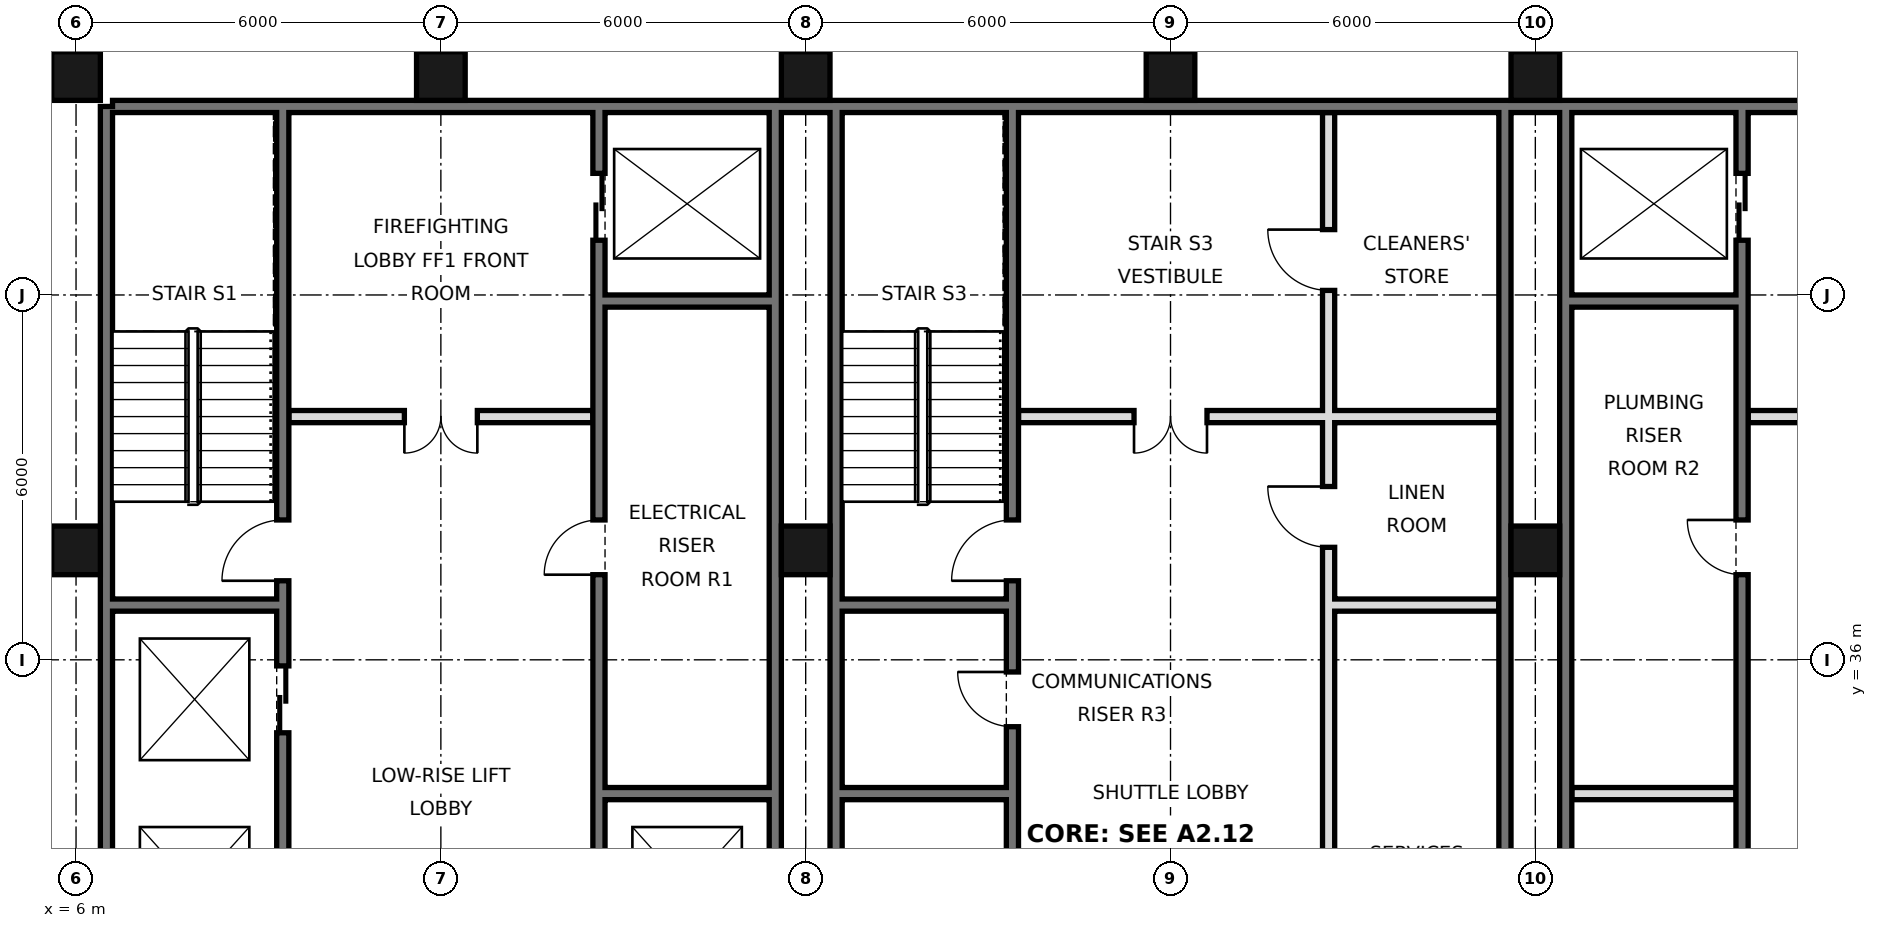
"""IFC4 building model, lengths in metres.
Left out: names, types, materials, properties, quantities, classifications, styles, units other than length and angle.
Written with IfcOpenShell. Run it as: python <this file> out.ifc"""

import sys

from ifc_helpers import new_model, si_unit, direction, frame, frame_2d, origin, origin_2d, place, context, subcontext, project, spatial, rectangle, hollow_rectangle, extrude, element, fill, save


model = new_model("IFC4")
c1 = context("Model", 3, precision=1e-05, world=origin(), true_north=direction((0.0, 1.0)))
c2 = subcontext(c1, "Body", "Model", "MODEL_VIEW")
j1 = project(units=[si_unit("LENGTHUNIT", "METRE"), si_unit("PLANEANGLEUNIT", "RADIAN")], contexts=[c1])
p1 = place(None, origin())
s1 = spatial("IfcSite", under=j1, at=p1, CompositionType="ELEMENT")
p2 = place(p1, origin())
s2 = spatial("IfcBuilding", under=s1, at=p2, CompositionType="ELEMENT")
p3 = place(p2, frame((0.0, 0.0, 49.8)))
s3 = spatial("IfcBuildingStorey", under=s2, at=p3, CompositionType="ELEMENT", Elevation=49.8)
for number, where, z_axis, x_axis in (
    (1, (6.0, 37.8, 0.0), (0.0, 0.0, 1.0), (1.0, 0.0, 0.0)),
    (2, (6.0, 45.6, 0.0), (0.0, 0.0, 1.0), (1.0, 0.0, 0.0)),
    (3, (12.0, 45.6, 0.0), (0.0, 0.0, 1.0), (1.0, 0.0, 0.0)),
    (4, (18.0, 37.8, 0.0), (0.0, 0.0, 1.0), (1.0, 0.0, 0.0)),
    (5, (18.0, 45.6, 0.0), (0.0, 0.0, 1.0), (1.0, 0.0, 0.0)),
    (6, (24.0, 45.6, 0.0), (0.0, 0.0, 1.0), (1.0, 0.0, 0.0)),
    (7, (30.0, 37.8, 0.0), (0.0, 0.0, 1.0), (1.0, 0.0, 0.0)),
    (8, (30.0, 45.6, 0.0), (0.0, 0.0, 1.0), (1.0, 0.0, 0.0)),
):
    element("IfcColumn", number, at=place(p3, frame(where, z_axis=z_axis, x_axis=x_axis)), inside=s3, PredefinedType="COLUMN", context=c2, shape_type="SweptSolid", body=[
        extrude(hollow_rectangle(XDim=0.8, YDim=0.8, WallThickness=0.06, at=origin_2d()), origin(), (0.0, 0.0, 1.0), 3.6),
    ])
p4 = place(p3, frame((6.5, 21.6, 0.0), z_axis=(0.0, 0.0, 1.0), x_axis=(0.0, 1.0, 0.0)))
e9 = element("IfcWall", 9, at=p4, inside=s3, PredefinedType="SOLIDWALL", context=c2, shape_type="SweptSolid", body=[
    extrude(rectangle(XDim=23.5, YDim=0.2, at=frame_2d((11.75, 0.0))), origin(), (0.0, 0.0, 1.0), 3.42),
])
p5 = place(p3, frame((6.6, 45.1, 0.0), z_axis=(0.0, 0.0, 1.0), x_axis=(1.0, 0.0, 0.0)))
e10 = element("IfcWall", 10, at=p5, inside=s3, PredefinedType="SOLIDWALL", context=c2, shape_type="SweptSolid", body=[
    extrude(rectangle(XDim=34.8, YDim=0.2, at=frame_2d((17.4, 0.0))), origin(), (0.0, 0.0, 1.0), 3.42),
])
for number, where, z_axis, x_axis in (
    (11, (17.5, 27.6, 0.0), (0.0, 0.0, 1.0), (0.0, 1.0, 0.0)),
    (12, (18.5, 27.6, 0.0), (0.0, 0.0, 1.0), (0.0, 1.0, 0.0)),
    (13, (29.5, 27.6, 0.0), (0.0, 0.0, 1.0), (0.0, 1.0, 0.0)),
    (14, (30.5, 27.6, 0.0), (0.0, 0.0, 1.0), (0.0, 1.0, 0.0)),
):
    element("IfcWall", number, at=place(p3, frame(where, z_axis=z_axis, x_axis=x_axis)), inside=s3, PredefinedType="SOLIDWALL", context=c2, shape_type="SweptSolid", body=[
        extrude(rectangle(XDim=17.5, YDim=0.2, at=frame_2d((8.75, 0.0))), origin(), (0.0, 0.0, 1.0), 3.42),
    ])
p6 = place(p3, frame((14.6, 27.5, 0.0), z_axis=(0.0, 0.0, 1.0), x_axis=(0.0, 1.0, 0.0)))
e15 = element("IfcWall", 15, at=p6, inside=s3, PredefinedType="SOLIDWALL", context=c2, shape_type="SweptSolid", body=[
    extrude(rectangle(XDim=17.5, YDim=0.2, at=frame_2d((8.75, 0.0))), origin(), (0.0, 0.0, 1.0), 3.42),
])
p7 = place(p6, frame((1.1, 0.0, 0.0)))
e16 = element("IfcOpeningElement", 16, at=p7, cuts=e15, PredefinedType="OPENING", context=c2, shape_type="SweptSolid", body=[
    extrude(rectangle(XDim=1.1, YDim=2.1, at=frame_2d((0.55, 1.05))), frame((0.0, 0.11, 0.0), z_axis=(0.0, -1.0, 0.0), x_axis=(1.0, 0.0, 0.0)), (0.0, 0.0, 1.0), 0.22),
])
p8 = place(p6, frame((4.2, 0.0, 0.0)))
e17 = element("IfcOpeningElement", 17, at=p8, cuts=e15, PredefinedType="OPENING", context=c2, shape_type="SweptSolid", body=[
    extrude(rectangle(XDim=1.1, YDim=2.1, at=frame_2d((0.55, 1.05))), frame((0.0, 0.11, 0.0), z_axis=(0.0, -1.0, 0.0), x_axis=(1.0, 0.0, 0.0)), (0.0, 0.0, 1.0), 0.22),
])
p9 = place(p6, frame((15.4, 0.0, 0.0)))
e18 = element("IfcOpeningElement", 18, at=p9, cuts=e15, PredefinedType="OPENING", context=c2, shape_type="SweptSolid", body=[
    extrude(rectangle(XDim=1.1, YDim=2.1, at=frame_2d((0.55, 1.05))), frame((0.0, 0.11, 0.0), z_axis=(0.0, -1.0, 0.0), x_axis=(1.0, 0.0, 0.0)), (0.0, 0.0, 1.0), 0.22),
])
p10 = place(p6, frame((9.9, 0.0, 0.0)))
e19 = element("IfcOpeningElement", 19, at=p10, cuts=e15, PredefinedType="OPENING", context=c2, shape_type="SweptSolid", body=[
    extrude(rectangle(XDim=0.9, YDim=2.1, at=frame_2d((0.45, 1.05))), frame((0.0, 0.11, 0.0), z_axis=(0.0, -1.0, 0.0), x_axis=(1.0, 0.0, 0.0)), (0.0, 0.0, 1.0), 0.22),
])
p11 = place(p3, frame((21.4, 27.5, 0.0), z_axis=(0.0, 0.0, 1.0), x_axis=(0.0, 1.0, 0.0)))
e20 = element("IfcWall", 20, at=p11, inside=s3, PredefinedType="SOLIDWALL", context=c2, shape_type="SweptSolid", body=[
    extrude(rectangle(XDim=17.5, YDim=0.2, at=frame_2d((8.75, 0.0))), origin(), (0.0, 0.0, 1.0), 3.42),
])
p12 = place(p11, frame((9.8, 0.0, 0.0)))
e21 = element("IfcOpeningElement", 21, at=p12, cuts=e20, PredefinedType="OPENING", context=c2, shape_type="SweptSolid", body=[
    extrude(rectangle(XDim=1.0, YDim=2.1, at=frame_2d((0.5, 1.05))), frame((0.0, 0.11, 0.0), z_axis=(0.0, -1.0, 0.0), x_axis=(1.0, 0.0, 0.0)), (0.0, 0.0, 1.0), 0.22),
])
p13 = place(p11, frame((7.4, 0.0, 0.0)))
e22 = element("IfcOpeningElement", 22, at=p13, cuts=e20, PredefinedType="OPENING", context=c2, shape_type="SweptSolid", body=[
    extrude(rectangle(XDim=0.9, YDim=2.1, at=frame_2d((0.45, 1.05))), frame((0.0, 0.11, 0.0), z_axis=(0.0, -1.0, 0.0), x_axis=(1.0, 0.0, 0.0)), (0.0, 0.0, 1.0), 0.22),
])
p14 = place(p3, frame((26.6, 27.5, 0.0), z_axis=(0.0, 0.0, 1.0), x_axis=(0.0, 1.0, 0.0)))
e23 = element("IfcWall", 23, at=p14, inside=s3, PredefinedType="SOLIDWALL", context=c2, shape_type="SweptSolid", body=[
    extrude(rectangle(XDim=17.5, YDim=0.2, at=frame_2d((8.75, 0.0))), origin(), (0.0, 0.0, 1.0), 3.42),
])
p15 = place(p14, frame((4.3, 0.0, 0.0)))
e24 = element("IfcOpeningElement", 24, at=p15, cuts=e23, PredefinedType="OPENING", context=c2, shape_type="SweptSolid", body=[
    extrude(rectangle(XDim=0.9, YDim=2.1, at=frame_2d((0.45, 1.05))), frame((0.0, 0.11, 0.0), z_axis=(0.0, -1.0, 0.0), x_axis=(1.0, 0.0, 0.0)), (0.0, 0.0, 1.0), 0.22),
])
p16 = place(p14, frame((10.35, 0.0, 0.0)))
e25 = element("IfcOpeningElement", 25, at=p16, cuts=e23, PredefinedType="OPENING", context=c2, shape_type="SweptSolid", body=[
    extrude(rectangle(XDim=1.0, YDim=2.1, at=frame_2d((0.5, 1.05))), frame((0.0, 0.11, 0.0), z_axis=(0.0, -1.0, 0.0), x_axis=(1.0, 0.0, 0.0)), (0.0, 0.0, 1.0), 0.22),
])
p17 = place(p14, frame((14.575, 0.0, 0.0)))
e26 = element("IfcOpeningElement", 26, at=p17, cuts=e23, PredefinedType="OPENING", context=c2, shape_type="SweptSolid", body=[
    extrude(rectangle(XDim=1.0, YDim=2.1, at=frame_2d((0.5, 1.05))), frame((0.0, 0.11, 0.0), z_axis=(0.0, -1.0, 0.0), x_axis=(1.0, 0.0, 0.0)), (0.0, 0.0, 1.0), 0.22),
])
p18 = place(p3, frame((33.4, 27.5, 0.0), z_axis=(0.0, 0.0, 1.0), x_axis=(0.0, 1.0, 0.0)))
e27 = element("IfcWall", 27, at=p18, inside=s3, PredefinedType="SOLIDWALL", context=c2, shape_type="SweptSolid", body=[
    extrude(rectangle(XDim=17.5, YDim=0.2, at=frame_2d((8.75, 0.0))), origin(), (0.0, 0.0, 1.0), 3.42),
])
p19 = place(p18, frame((15.4, 0.0, 0.0)))
e28 = element("IfcOpeningElement", 28, at=p19, cuts=e27, PredefinedType="OPENING", context=c2, shape_type="SweptSolid", body=[
    extrude(rectangle(XDim=1.1, YDim=2.1, at=frame_2d((0.55, 1.05))), frame((0.0, 0.11, 0.0), z_axis=(0.0, -1.0, 0.0), x_axis=(1.0, 0.0, 0.0)), (0.0, 0.0, 1.0), 0.22),
])
p20 = place(p18, frame((2.7, 0.0, 0.0)))
e29 = element("IfcOpeningElement", 29, at=p20, cuts=e27, PredefinedType="OPENING", context=c2, shape_type="SweptSolid", body=[
    extrude(rectangle(XDim=1.0, YDim=2.1, at=frame_2d((0.5, 1.05))), frame((0.0, 0.11, 0.0), z_axis=(0.0, -1.0, 0.0), x_axis=(1.0, 0.0, 0.0)), (0.0, 0.0, 1.0), 0.22),
])
p21 = place(p18, frame((9.9, 0.0, 0.0)))
e30 = element("IfcOpeningElement", 30, at=p21, cuts=e27, PredefinedType="OPENING", context=c2, shape_type="SweptSolid", body=[
    extrude(rectangle(XDim=0.9, YDim=2.1, at=frame_2d((0.45, 1.05))), frame((0.0, 0.11, 0.0), z_axis=(0.0, -1.0, 0.0), x_axis=(1.0, 0.0, 0.0)), (0.0, 0.0, 1.0), 0.22),
])
p22 = place(p3, frame((9.4, 21.6, 0.0), z_axis=(0.0, 0.0, 1.0), x_axis=(0.0, 1.0, 0.0)))
e31 = element("IfcWall", 31, at=p22, inside=s3, PredefinedType="SOLIDWALL", context=c2, shape_type="SweptSolid", body=[
    extrude(rectangle(XDim=23.4, YDim=0.2, at=frame_2d((11.7, 0.0))), origin(), (0.0, 0.0, 1.0), 3.42),
])
p23 = place(p22, frame((7.0, 0.0, 0.0)))
e32 = element("IfcOpeningElement", 32, at=p23, cuts=e31, PredefinedType="OPENING", context=c2, shape_type="SweptSolid", body=[
    extrude(rectangle(XDim=1.1, YDim=2.1, at=frame_2d((0.55, 1.05))), frame((0.0, 0.11, 0.0), z_axis=(0.0, -1.0, 0.0), x_axis=(1.0, 0.0, 0.0)), (0.0, 0.0, 1.0), 0.22),
])
p24 = place(p22, frame((10.1, 0.0, 0.0)))
e33 = element("IfcOpeningElement", 33, at=p24, cuts=e31, PredefinedType="OPENING", context=c2, shape_type="SweptSolid", body=[
    extrude(rectangle(XDim=1.1, YDim=2.1, at=frame_2d((0.55, 1.05))), frame((0.0, 0.11, 0.0), z_axis=(0.0, -1.0, 0.0), x_axis=(1.0, 0.0, 0.0)), (0.0, 0.0, 1.0), 0.22),
])
p25 = place(p22, frame((13.2, 0.0, 0.0)))
e34 = element("IfcOpeningElement", 34, at=p25, cuts=e31, PredefinedType="OPENING", context=c2, shape_type="SweptSolid", body=[
    extrude(rectangle(XDim=1.1, YDim=2.1, at=frame_2d((0.55, 1.05))), frame((0.0, 0.11, 0.0), z_axis=(0.0, -1.0, 0.0), x_axis=(1.0, 0.0, 0.0)), (0.0, 0.0, 1.0), 0.22),
])
p26 = place(p22, frame((15.7, 0.0, 0.0)))
e35 = element("IfcOpeningElement", 35, at=p26, cuts=e31, PredefinedType="OPENING", context=c2, shape_type="SweptSolid", body=[
    extrude(rectangle(XDim=1.0, YDim=2.1, at=frame_2d((0.5, 1.05))), frame((0.0, 0.11, 0.0), z_axis=(0.0, -1.0, 0.0), x_axis=(1.0, 0.0, 0.0)), (0.0, 0.0, 1.0), 0.22),
])
p27 = place(p22, frame((0.175, 0.0, 0.0)))
e36 = element("IfcOpeningElement", 36, at=p27, cuts=e31, PredefinedType="OPENING", context=c2, shape_type="SweptSolid", body=[
    extrude(rectangle(XDim=0.9, YDim=2.1, at=frame_2d((0.45, 1.05))), frame((0.0, 0.11, 0.0), z_axis=(0.0, -1.0, 0.0), x_axis=(1.0, 0.0, 0.0)), (0.0, 0.0, 1.0), 0.22),
])
for number, where, z_axis, x_axis in (
    (37, (14.7, 33.8, 0.0), (0.0, 0.0, 1.0), (1.0, 0.0, 0.0)),
    (38, (18.6, 33.8, 0.0), (0.0, 0.0, 1.0), (1.0, 0.0, 0.0)),
    (39, (30.6, 33.8, 0.0), (0.0, 0.0, 1.0), (1.0, 0.0, 0.0)),
    (40, (18.6, 36.9, 0.0), (0.0, 0.0, 1.0), (1.0, 0.0, 0.0)),
    (41, (26.7, 36.9, 0.0), (0.0, 0.0, 1.0), (1.0, 0.0, 0.0)),
    (42, (6.6, 36.9, 0.0), (0.0, 0.0, 1.0), (1.0, 0.0, 0.0)),
):
    element("IfcWall", number, at=place(p3, frame(where, z_axis=z_axis, x_axis=x_axis)), inside=s3, PredefinedType="SOLIDWALL", context=c2, shape_type="SweptSolid", body=[
        extrude(rectangle(XDim=2.7, YDim=0.2, at=frame_2d((1.35, 0.0))), origin(), (0.0, 0.0, 1.0), 3.42),
    ])
p28 = place(p3, frame((21.5, 40.0, 0.0), z_axis=(0.0, 0.0, 1.0), x_axis=(1.0, 0.0, 0.0)))
e43 = element("IfcWall", 43, at=p28, inside=s3, PredefinedType="PARTITIONING", context=c2, shape_type="SweptSolid", body=[
    extrude(rectangle(XDim=7.9, YDim=0.2, at=frame_2d((3.95, 0.0))), origin(), (0.0, 0.0, 1.0), 3.42),
])
p29 = place(p28, frame((1.9, 0.0, 0.0)))
e44 = element("IfcOpeningElement", 44, at=p29, cuts=e43, PredefinedType="OPENING", context=c2, shape_type="SweptSolid", body=[
    extrude(rectangle(XDim=1.2, YDim=2.1, at=frame_2d((0.6, 1.05))), frame((0.0, 0.11, 0.0), z_axis=(0.0, -1.0, 0.0), x_axis=(1.0, 0.0, 0.0)), (0.0, 0.0, 1.0), 0.22),
])
p30 = place(p3, frame((33.5, 40.0, 0.0), z_axis=(0.0, 0.0, 1.0), x_axis=(1.0, 0.0, 0.0)))
e45 = element("IfcWall", 45, at=p30, inside=s3, PredefinedType="PARTITIONING", context=c2, shape_type="SweptSolid", body=[
    extrude(rectangle(XDim=5.0, YDim=0.2, at=frame_2d((2.5, 0.0))), origin(), (0.0, 0.0, 1.0), 3.42),
])
p31 = place(p30, frame((1.9, 0.0, 0.0)))
e46 = element("IfcOpeningElement", 46, at=p31, cuts=e45, PredefinedType="OPENING", context=c2, shape_type="SweptSolid", body=[
    extrude(rectangle(XDim=1.2, YDim=2.1, at=frame_2d((0.6, 1.05))), frame((0.0, 0.11, 0.0), z_axis=(0.0, -1.0, 0.0), x_axis=(1.0, 0.0, 0.0)), (0.0, 0.0, 1.0), 0.22),
])
p32 = place(p3, frame((9.5, 40.0, 0.0), z_axis=(0.0, 0.0, 1.0), x_axis=(1.0, 0.0, 0.0)))
e47 = element("IfcWall", 47, at=p32, inside=s3, PredefinedType="PARTITIONING", context=c2, shape_type="SweptSolid", body=[
    extrude(rectangle(XDim=5.0, YDim=0.2, at=frame_2d((2.5, 0.0))), origin(), (0.0, 0.0, 1.0), 3.42),
])
p33 = place(p32, frame((1.9, 0.0, 0.0)))
e48 = element("IfcOpeningElement", 48, at=p33, cuts=e47, PredefinedType="OPENING", context=c2, shape_type="SweptSolid", body=[
    extrude(rectangle(XDim=1.2, YDim=2.1, at=frame_2d((0.6, 1.05))), frame((0.0, 0.11, 0.0), z_axis=(0.0, -1.0, 0.0), x_axis=(1.0, 0.0, 0.0)), (0.0, 0.0, 1.0), 0.22),
])
for number, where, z_axis, x_axis in (
    (49, (14.7, 41.9, 0.0), (0.0, 0.0, 1.0), (1.0, 0.0, 0.0)),
    (50, (30.6, 41.9, 0.0), (0.0, 0.0, 1.0), (1.0, 0.0, 0.0)),
):
    element("IfcWall", number, at=place(p3, frame(where, z_axis=z_axis, x_axis=x_axis)), inside=s3, PredefinedType="SOLIDWALL", context=c2, shape_type="SweptSolid", body=[
        extrude(rectangle(XDim=2.7, YDim=0.2, at=frame_2d((1.35, 0.0))), origin(), (0.0, 0.0, 1.0), 3.42),
    ])
p34 = place(p33, frame((1.2, 0.0, 0.0), z_axis=(0.0, 0.0, 1.0), x_axis=(-1.0, 0.0, 0.0)))
e51 = element("IfcDoor", 51, at=p34, inside=s3, OperationType="DOUBLE_DOOR_SINGLE_SWING", PredefinedType="DOOR", context=c2, shape_type="SweptSolid", body=[
    extrude(rectangle(XDim=1.2, YDim=2.1, at=frame_2d((0.6, 1.05))), frame((0.0, 0.025, 0.0), z_axis=(0.0, -1.0, 0.0), x_axis=(1.0, 0.0, 0.0)), (0.0, 0.0, 1.0), 0.05),
])
fill(e48, e51)
p35 = place(p29, frame((1.2, 0.0, 0.0), z_axis=(0.0, 0.0, 1.0), x_axis=(-1.0, 0.0, 0.0)))
e52 = element("IfcDoor", 52, at=p35, inside=s3, OperationType="DOUBLE_DOOR_SINGLE_SWING", PredefinedType="DOOR", context=c2, shape_type="SweptSolid", body=[
    extrude(rectangle(XDim=1.2, YDim=2.1, at=frame_2d((0.6, 1.05))), frame((0.0, 0.025, 0.0), z_axis=(0.0, -1.0, 0.0), x_axis=(1.0, 0.0, 0.0)), (0.0, 0.0, 1.0), 0.05),
])
fill(e44, e52)
p36 = place(p19, origin())
e53 = element("IfcDoor", 53, at=p36, inside=s3, OperationType="DOUBLE_DOOR_SLIDING", PredefinedType="DOOR", context=c2, shape_type="SweptSolid", body=[
    extrude(rectangle(XDim=1.1, YDim=2.1, at=frame_2d((0.55, 1.05))), frame((0.0, 0.025, 0.0), z_axis=(0.0, -1.0, 0.0), x_axis=(1.0, 0.0, 0.0)), (0.0, 0.0, 1.0), 0.05),
])
fill(e28, e53)
p37 = place(p9, origin())
e54 = element("IfcDoor", 54, at=p37, inside=s3, OperationType="DOUBLE_DOOR_SLIDING", PredefinedType="DOOR", context=c2, shape_type="SweptSolid", body=[
    extrude(rectangle(XDim=1.1, YDim=2.1, at=frame_2d((0.55, 1.05))), frame((0.0, 0.025, 0.0), z_axis=(0.0, -1.0, 0.0), x_axis=(1.0, 0.0, 0.0)), (0.0, 0.0, 1.0), 0.05),
])
fill(e18, e54)
p38 = place(p25, origin())
e55 = element("IfcDoor", 55, at=p38, inside=s3, OperationType="DOUBLE_DOOR_SLIDING", PredefinedType="DOOR", context=c2, shape_type="SweptSolid", body=[
    extrude(rectangle(XDim=1.1, YDim=2.1, at=frame_2d((0.55, 1.05))), frame((0.0, 0.025, 0.0), z_axis=(0.0, -1.0, 0.0), x_axis=(1.0, 0.0, 0.0)), (0.0, 0.0, 1.0), 0.05),
])
fill(e34, e55)
p39 = place(p26, origin())
e56 = element("IfcDoor", 56, at=p39, inside=s3, OperationType="SINGLE_SWING_LEFT", PredefinedType="DOOR", context=c2, shape_type="SweptSolid", body=[
    extrude(rectangle(XDim=1.0, YDim=2.1, at=frame_2d((0.5, 1.05))), frame((0.0, 0.025, 0.0), z_axis=(0.0, -1.0, 0.0), x_axis=(1.0, 0.0, 0.0)), (0.0, 0.0, 1.0), 0.05),
])
fill(e35, e56)
p40 = place(p12, origin())
e57 = element("IfcDoor", 57, at=p40, inside=s3, OperationType="SINGLE_SWING_LEFT", PredefinedType="DOOR", context=c2, shape_type="SweptSolid", body=[
    extrude(rectangle(XDim=1.0, YDim=2.1, at=frame_2d((0.5, 1.05))), frame((0.0, 0.025, 0.0), z_axis=(0.0, -1.0, 0.0), x_axis=(1.0, 0.0, 0.0)), (0.0, 0.0, 1.0), 0.05),
])
fill(e21, e57)
p41 = place(p10, origin())
e58 = element("IfcDoor", 58, at=p41, inside=s3, OperationType="SINGLE_SWING_LEFT", PredefinedType="DOOR", context=c2, shape_type="SweptSolid", body=[
    extrude(rectangle(XDim=0.9, YDim=2.1, at=frame_2d((0.45, 1.05))), frame((0.0, 0.025, 0.0), z_axis=(0.0, -1.0, 0.0), x_axis=(1.0, 0.0, 0.0)), (0.0, 0.0, 1.0), 0.05),
])
fill(e19, e58)
p42 = place(p21, frame((0.9, 0.0, 0.0), z_axis=(0.0, 0.0, 1.0), x_axis=(-1.0, 0.0, 0.0)))
e59 = element("IfcDoor", 59, at=p42, inside=s3, OperationType="SINGLE_SWING_LEFT", PredefinedType="DOOR", context=c2, shape_type="SweptSolid", body=[
    extrude(rectangle(XDim=0.9, YDim=2.1, at=frame_2d((0.45, 1.05))), frame((0.0, 0.025, 0.0), z_axis=(0.0, -1.0, 0.0), x_axis=(1.0, 0.0, 0.0)), (0.0, 0.0, 1.0), 0.05),
])
fill(e30, e59)
p43 = place(p13, frame((0.9, 0.0, 0.0), z_axis=(0.0, 0.0, 1.0), x_axis=(-1.0, 0.0, 0.0)))
e60 = element("IfcDoor", 60, at=p43, inside=s3, OperationType="SINGLE_SWING_LEFT", PredefinedType="DOOR", context=c2, shape_type="SweptSolid", body=[
    extrude(rectangle(XDim=0.9, YDim=2.1, at=frame_2d((0.45, 1.05))), frame((0.0, 0.025, 0.0), z_axis=(0.0, -1.0, 0.0), x_axis=(1.0, 0.0, 0.0)), (0.0, 0.0, 1.0), 0.05),
])
fill(e22, e60)
p44 = place(p16, frame((1.0, 0.0, 0.0), z_axis=(0.0, 0.0, 1.0), x_axis=(-1.0, 0.0, 0.0)))
e61 = element("IfcDoor", 61, at=p44, inside=s3, OperationType="SINGLE_SWING_LEFT", PredefinedType="DOOR", context=c2, shape_type="SweptSolid", body=[
    extrude(rectangle(XDim=1.0, YDim=2.1, at=frame_2d((0.5, 1.05))), frame((0.0, 0.025, 0.0), z_axis=(0.0, -1.0, 0.0), x_axis=(1.0, 0.0, 0.0)), (0.0, 0.0, 1.0), 0.05),
])
fill(e25, e61)
p45 = place(p17, frame((1.0, 0.0, 0.0), z_axis=(0.0, 0.0, 1.0), x_axis=(-1.0, 0.0, 0.0)))
e62 = element("IfcDoor", 62, at=p45, inside=s3, OperationType="SINGLE_SWING_LEFT", PredefinedType="DOOR", context=c2, shape_type="SweptSolid", body=[
    extrude(rectangle(XDim=1.0, YDim=2.1, at=frame_2d((0.5, 1.05))), frame((0.0, 0.025, 0.0), z_axis=(0.0, -1.0, 0.0), x_axis=(1.0, 0.0, 0.0)), (0.0, 0.0, 1.0), 0.05),
])
fill(e26, e62)
save(model, sys.argv[1])
